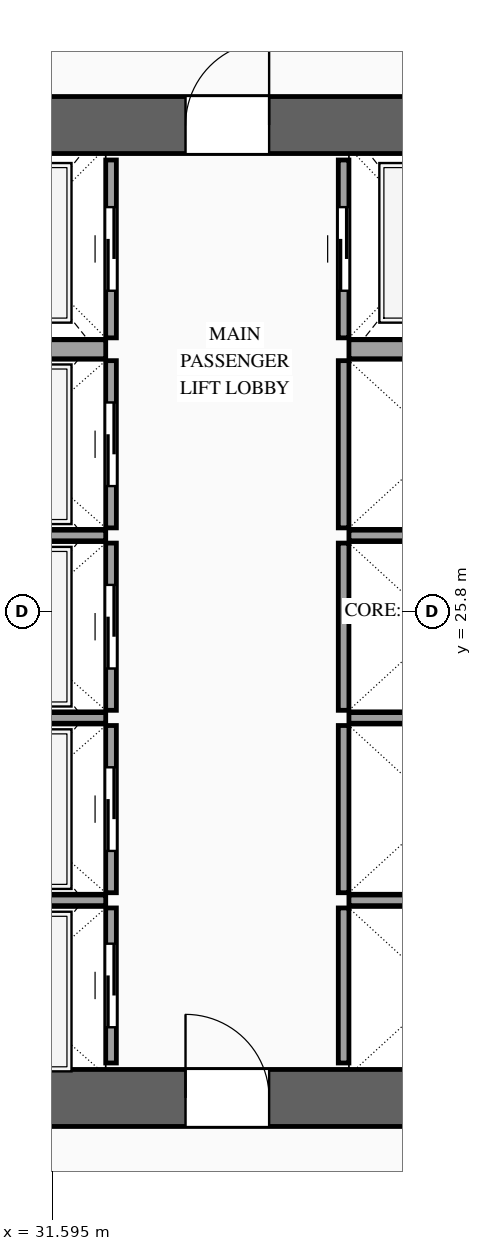
"""IFC4 building model, lengths in metres.
Left out: names, types, materials, properties, quantities, classifications, styles, units other than length and angle.
Written with IfcOpenShell. Run it as: python <this file> out.ifc"""

import sys

from ifc_helpers import new_model, si_unit, direction, frame, frame_2d, origin, place, context, subcontext, project, spatial, rectangle, extrude, source, transform, mapped, element, fill, save


model = new_model("IFC4")
c1 = context("Model", 3, precision=1e-05, world=origin(), true_north=direction((0.0, 1.0)))
c2 = subcontext(c1, "Body", "Model", "MODEL_VIEW")
j1 = project(units=[si_unit("LENGTHUNIT", "METRE"), si_unit("PLANEANGLEUNIT", "RADIAN")], contexts=[c1])
p1 = place(None, origin())
s1 = spatial("IfcSite", under=j1, at=p1, CompositionType="ELEMENT")
p2 = place(p1, origin())
s2 = spatial("IfcBuilding", under=s1, at=p2, CompositionType="ELEMENT")
p3 = place(p2, frame((0.0, 0.0, 97.4)))
s3 = spatial("IfcBuildingStorey", under=s2, at=p3, CompositionType="ELEMENT", Elevation=97.4)
p4 = place(p3, frame((23.425, 19.4, 0.0), z_axis=(0.0, 0.0, 1.0), x_axis=(1.0, 0.0, 0.0)))
e1 = element("IfcWall", 1, at=p4, inside=s3, PredefinedType="SHEAR", context=c2, shape_type="SweptSolid", body=[
    extrude(rectangle(XDim=27.15, YDim=0.75, at=frame_2d((13.575, 0.0))), origin(), (0.0, 0.0, 1.0), 3.6),
])
p5 = place(p4, frame((2.025, 0.0, 0.0)))
e2 = element("IfcOpeningElement", 2, at=p5, cuts=e1, PredefinedType="OPENING", context=c2, shape_type="SweptSolid", body=[
    extrude(rectangle(XDim=1.1, YDim=2.2, at=frame_2d((0.55, 1.1))), frame((0.0, 0.39, 0.0), z_axis=(0.0, -1.0, 0.0), x_axis=(1.0, 0.0, 0.0)), (0.0, 0.0, 1.0), 0.78),
])
p6 = place(p4, frame((9.925, 0.0, 0.0)))
e3 = element("IfcOpeningElement", 3, at=p6, cuts=e1, PredefinedType="OPENING", context=c2, shape_type="SweptSolid", body=[
    extrude(rectangle(XDim=1.1, YDim=2.2, at=frame_2d((0.55, 1.1))), frame((0.0, 0.39, 0.0), z_axis=(0.0, -1.0, 0.0), x_axis=(1.0, 0.0, 0.0)), (0.0, 0.0, 1.0), 0.78),
])
p7 = place(p4, frame((23.125, 0.0, 0.0)))
e4 = element("IfcOpeningElement", 4, at=p7, cuts=e1, PredefinedType="OPENING", context=c2, shape_type="SweptSolid", body=[
    extrude(rectangle(XDim=1.1, YDim=2.2, at=frame_2d((0.55, 1.1))), frame((0.0, 0.39, 0.0), z_axis=(0.0, -1.0, 0.0), x_axis=(1.0, 0.0, 0.0)), (0.0, 0.0, 1.0), 0.78),
])
p8 = place(p4, frame((19.745, 0.0, 0.0)))
e5 = element("IfcOpeningElement", 5, at=p8, cuts=e1, PredefinedType="OPENING", context=c2, shape_type="SweptSolid", body=[
    extrude(rectangle(XDim=0.9, YDim=2.15, at=frame_2d((0.45, 1.075))), frame((0.0, 0.39, 0.0), z_axis=(0.0, -1.0, 0.0), x_axis=(1.0, 0.0, 0.0)), (0.0, 0.0, 1.0), 0.78),
])
p9 = place(p4, frame((18.305, 0.0, 0.0)))
e6 = element("IfcOpeningElement", 6, at=p9, cuts=e1, PredefinedType="OPENING", context=c2, shape_type="SweptSolid", body=[
    extrude(rectangle(XDim=0.9, YDim=2.15, at=frame_2d((0.45, 1.075))), frame((0.0, 0.39, 0.0), z_axis=(0.0, -1.0, 0.0), x_axis=(1.0, 0.0, 0.0)), (0.0, 0.0, 1.0), 0.78),
])
p10 = place(p3, frame((23.425, 32.2, 0.0), z_axis=(0.0, 0.0, 1.0), x_axis=(1.0, 0.0, 0.0)))
e7 = element("IfcWall", 7, at=p10, inside=s3, PredefinedType="SHEAR", context=c2, shape_type="SweptSolid", body=[
    extrude(rectangle(XDim=27.15, YDim=0.75, at=frame_2d((13.575, 0.0))), origin(), (0.0, 0.0, 1.0), 3.6),
])
p11 = place(p10, frame((4.645, 0.0, 0.0)))
e8 = element("IfcOpeningElement", 8, at=p11, cuts=e7, PredefinedType="OPENING", context=c2, shape_type="SweptSolid", body=[
    extrude(rectangle(XDim=0.9, YDim=2.15, at=frame_2d((0.45, 1.075))), frame((0.0, 0.39, 0.0), z_axis=(0.0, -1.0, 0.0), x_axis=(1.0, 0.0, 0.0)), (0.0, 0.0, 1.0), 0.78),
])
p12 = place(p10, frame((9.925, 0.0, 0.0)))
e9 = element("IfcOpeningElement", 9, at=p12, cuts=e7, PredefinedType="OPENING", context=c2, shape_type="SweptSolid", body=[
    extrude(rectangle(XDim=1.1, YDim=2.2, at=frame_2d((0.55, 1.1))), frame((0.0, 0.39, 0.0), z_axis=(0.0, -1.0, 0.0), x_axis=(1.0, 0.0, 0.0)), (0.0, 0.0, 1.0), 0.78),
])
p13 = place(p10, frame((15.775, 0.0, 0.0)))
e10 = element("IfcOpeningElement", 10, at=p13, cuts=e7, PredefinedType="OPENING", context=c2, shape_type="SweptSolid", body=[
    extrude(rectangle(XDim=1.1, YDim=2.2, at=frame_2d((0.55, 1.1))), frame((0.0, 0.39, 0.0), z_axis=(0.0, -1.0, 0.0), x_axis=(1.0, 0.0, 0.0)), (0.0, 0.0, 1.0), 0.78),
])
p14 = place(p10, frame((18.975, 0.0, 0.0)))
e11 = element("IfcOpeningElement", 11, at=p14, cuts=e7, PredefinedType="OPENING", context=c2, shape_type="SweptSolid", body=[
    extrude(rectangle(XDim=0.9, YDim=2.15, at=frame_2d((0.45, 1.075))), frame((0.0, 0.39, 0.0), z_axis=(0.0, -1.0, 0.0), x_axis=(1.0, 0.0, 0.0)), (0.0, 0.0, 1.0), 0.78),
])
p15 = place(p3, frame((32.37, 19.86, 0.0), z_axis=(0.0, 0.0, 1.0), x_axis=(0.0, 1.0, 0.0)))
e12 = element("IfcWall", 12, at=p15, inside=s3, PredefinedType="SOLIDWALL", context=c2, shape_type="SweptSolid", body=[
    extrude(rectangle(XDim=2.04, YDim=0.14, at=frame_2d((1.02, 0.0))), origin(), (0.0, 0.0, 1.0), 3.38),
])
p16 = place(p15, frame((0.47, 0.0, 0.0)))
e13 = element("IfcOpeningElement", 13, at=p16, cuts=e12, PredefinedType="OPENING", context=c2, shape_type="SweptSolid", body=[
    extrude(rectangle(XDim=1.1, YDim=2.2, at=frame_2d((0.55, 1.1))), frame((0.0, 0.085, 0.0), z_axis=(0.0, -1.0, 0.0), x_axis=(1.0, 0.0, 0.0)), (0.0, 0.0, 1.0), 0.17),
])
m1 = source(origin(), c2, "Body", "SweptSolid", [
    extrude(rectangle(XDim=2.5, YDim=0.14, at=frame_2d((1.25, 0.0))), origin(), (0.0, 0.0, 1.0), 3.38),
])
p17 = place(p3, frame((29.8, 22.0, 0.0), z_axis=(0.0, 0.0, 1.0), x_axis=(1.0, 0.0, 0.0)))
e14 = element("IfcWall", 14, at=p17, inside=s3, PredefinedType="SOLIDWALL", context=c2, shape_type="MappedRepresentation", body=[
    mapped(m1, transform((0.0, 0.0, 0.0), scale=1.0)),
])
p18 = place(p3, frame((32.37, 22.1, 0.0), z_axis=(0.0, 0.0, 1.0), x_axis=(0.0, 1.0, 0.0)))
e15 = element("IfcWall", 15, at=p18, inside=s3, PredefinedType="SOLIDWALL", context=c2, shape_type="SweptSolid", body=[
    extrude(rectangle(XDim=2.2, YDim=0.14, at=frame_2d((1.1, 0.0))), origin(), (0.0, 0.0, 1.0), 3.38),
])
p19 = place(p18, frame((0.55, 0.0, 0.0)))
e16 = element("IfcOpeningElement", 16, at=p19, cuts=e15, PredefinedType="OPENING", context=c2, shape_type="SweptSolid", body=[
    extrude(rectangle(XDim=1.1, YDim=2.2, at=frame_2d((0.55, 1.1))), frame((0.0, 0.085, 0.0), z_axis=(0.0, -1.0, 0.0), x_axis=(1.0, 0.0, 0.0)), (0.0, 0.0, 1.0), 0.17),
])
p20 = place(p3, frame((29.8, 24.4, 0.0), z_axis=(0.0, 0.0, 1.0), x_axis=(1.0, 0.0, 0.0)))
e17 = element("IfcWall", 17, at=p20, inside=s3, PredefinedType="SOLIDWALL", context=c2, shape_type="MappedRepresentation", body=[
    mapped(m1, transform((0.0, 0.0, 0.0), scale=1.0)),
])
p21 = place(p3, frame((32.37, 24.5, 0.0), z_axis=(0.0, 0.0, 1.0), x_axis=(0.0, 1.0, 0.0)))
e18 = element("IfcWall", 18, at=p21, inside=s3, PredefinedType="SOLIDWALL", context=c2, shape_type="SweptSolid", body=[
    extrude(rectangle(XDim=2.2, YDim=0.14, at=frame_2d((1.1, 0.0))), origin(), (0.0, 0.0, 1.0), 3.38),
])
p22 = place(p21, frame((0.55, 0.0, 0.0)))
e19 = element("IfcOpeningElement", 19, at=p22, cuts=e18, PredefinedType="OPENING", context=c2, shape_type="SweptSolid", body=[
    extrude(rectangle(XDim=1.1, YDim=2.2, at=frame_2d((0.55, 1.1))), frame((0.0, 0.085, 0.0), z_axis=(0.0, -1.0, 0.0), x_axis=(1.0, 0.0, 0.0)), (0.0, 0.0, 1.0), 0.17),
])
p23 = place(p3, frame((29.8, 26.8, 0.0), z_axis=(0.0, 0.0, 1.0), x_axis=(1.0, 0.0, 0.0)))
e20 = element("IfcWall", 20, at=p23, inside=s3, PredefinedType="SOLIDWALL", context=c2, shape_type="MappedRepresentation", body=[
    mapped(m1, transform((0.0, 0.0, 0.0), scale=1.0)),
])
p24 = place(p3, frame((32.37, 26.9, 0.0), z_axis=(0.0, 0.0, 1.0), x_axis=(0.0, 1.0, 0.0)))
e21 = element("IfcWall", 21, at=p24, inside=s3, PredefinedType="SOLIDWALL", context=c2, shape_type="SweptSolid", body=[
    extrude(rectangle(XDim=2.2, YDim=0.14, at=frame_2d((1.1, 0.0))), origin(), (0.0, 0.0, 1.0), 3.38),
])
p25 = place(p24, frame((0.55, 0.0, 0.0)))
e22 = element("IfcOpeningElement", 22, at=p25, cuts=e21, PredefinedType="OPENING", context=c2, shape_type="SweptSolid", body=[
    extrude(rectangle(XDim=1.1, YDim=2.2, at=frame_2d((0.55, 1.1))), frame((0.0, 0.085, 0.0), z_axis=(0.0, -1.0, 0.0), x_axis=(1.0, 0.0, 0.0)), (0.0, 0.0, 1.0), 0.17),
])
p26 = place(p3, frame((32.37, 29.4, 0.0), z_axis=(0.0, 0.0, 1.0), x_axis=(0.0, 1.0, 0.0)))
e23 = element("IfcWall", 23, at=p26, inside=s3, PredefinedType="SOLIDWALL", context=c2, shape_type="SweptSolid", body=[
    extrude(rectangle(XDim=2.34, YDim=0.14, at=frame_2d((1.17, 0.0))), origin(), (0.0, 0.0, 1.0), 3.38),
])
p27 = place(p26, frame((0.62, 0.0, 0.0)))
e24 = element("IfcOpeningElement", 24, at=p27, cuts=e23, PredefinedType="OPENING", context=c2, shape_type="SweptSolid", body=[
    extrude(rectangle(XDim=1.1, YDim=2.2, at=frame_2d((0.55, 1.1))), frame((0.0, 0.085, 0.0), z_axis=(0.0, -1.0, 0.0), x_axis=(1.0, 0.0, 0.0)), (0.0, 0.0, 1.0), 0.17),
])
m2 = source(origin(), c2, "Body", "SweptSolid", [
    extrude(rectangle(XDim=2.5, YDim=0.25, at=frame_2d((1.25, 0.0))), origin(), (0.0, 0.0, 1.0), 3.38),
])
p28 = place(p3, frame((29.8, 29.25, 0.0), z_axis=(0.0, 0.0, 1.0), x_axis=(1.0, 0.0, 0.0)))
e25 = element("IfcWall", 25, at=p28, inside=s3, PredefinedType="SOLIDWALL", context=c2, shape_type="MappedRepresentation", body=[
    mapped(m2, transform((0.0, 0.0, 0.0), scale=1.0)),
])
m3 = source(origin(), c2, "Body", "SweptSolid", [
    extrude(rectangle(XDim=2.04, YDim=0.14, at=frame_2d((1.02, 0.0))), origin(), (0.0, 0.0, 1.0), 3.38),
])
p29 = place(p3, frame((35.43, 19.86, 0.0), z_axis=(0.0, 0.0, 1.0), x_axis=(0.0, 1.0, 0.0)))
e26 = element("IfcWall", 26, at=p29, inside=s3, PredefinedType="SOLIDWALL", context=c2, shape_type="MappedRepresentation", body=[
    mapped(m3, transform((0.0, 0.0, 0.0), scale=1.0)),
])
m4 = source(origin(), c2, "Body", "SweptSolid", [
    extrude(rectangle(XDim=2.4, YDim=0.14, at=frame_2d((1.2, 0.0))), origin(), (0.0, 0.0, 1.0), 3.38),
])
p30 = place(p3, frame((35.5, 22.0, 0.0), z_axis=(0.0, 0.0, 1.0), x_axis=(1.0, 0.0, 0.0)))
e27 = element("IfcWall", 27, at=p30, inside=s3, PredefinedType="SOLIDWALL", context=c2, shape_type="MappedRepresentation", body=[
    mapped(m4, transform((0.0, 0.0, 0.0), scale=1.0)),
])
m5 = source(origin(), c2, "Body", "SweptSolid", [
    extrude(rectangle(XDim=2.2, YDim=0.14, at=frame_2d((1.1, 0.0))), origin(), (0.0, 0.0, 1.0), 3.38),
])
p31 = place(p3, frame((35.43, 22.1, 0.0), z_axis=(0.0, 0.0, 1.0), x_axis=(0.0, 1.0, 0.0)))
e28 = element("IfcWall", 28, at=p31, inside=s3, PredefinedType="SOLIDWALL", context=c2, shape_type="MappedRepresentation", body=[
    mapped(m5, transform((0.0, 0.0, 0.0), scale=1.0)),
])
p32 = place(p3, frame((35.5, 24.4, 0.0), z_axis=(0.0, 0.0, 1.0), x_axis=(1.0, 0.0, 0.0)))
e29 = element("IfcWall", 29, at=p32, inside=s3, PredefinedType="SOLIDWALL", context=c2, shape_type="MappedRepresentation", body=[
    mapped(m4, transform((0.0, 0.0, 0.0), scale=1.0)),
])
p33 = place(p3, frame((35.43, 24.5, 0.0), z_axis=(0.0, 0.0, 1.0), x_axis=(0.0, 1.0, 0.0)))
e30 = element("IfcWall", 30, at=p33, inside=s3, PredefinedType="SOLIDWALL", context=c2, shape_type="MappedRepresentation", body=[
    mapped(m5, transform((0.0, 0.0, 0.0), scale=1.0)),
])
p34 = place(p3, frame((35.5, 26.8, 0.0), z_axis=(0.0, 0.0, 1.0), x_axis=(1.0, 0.0, 0.0)))
e31 = element("IfcWall", 31, at=p34, inside=s3, PredefinedType="SOLIDWALL", context=c2, shape_type="MappedRepresentation", body=[
    mapped(m4, transform((0.0, 0.0, 0.0), scale=1.0)),
])
m6 = source(origin(), c2, "Body", "SweptSolid", [
    extrude(rectangle(XDim=2.2, YDim=0.14, at=frame_2d((1.1, 0.0))), origin(), (0.0, 0.0, 1.0), 3.38),
])
p35 = place(p3, frame((35.43, 26.9, 0.0), z_axis=(0.0, 0.0, 1.0), x_axis=(0.0, 1.0, 0.0)))
e32 = element("IfcWall", 32, at=p35, inside=s3, PredefinedType="SOLIDWALL", context=c2, shape_type="MappedRepresentation", body=[
    mapped(m6, transform((0.0, 0.0, 0.0), scale=1.0)),
])
p36 = place(p3, frame((35.43, 29.4, 0.0), z_axis=(0.0, 0.0, 1.0), x_axis=(0.0, 1.0, 0.0)))
e33 = element("IfcWall", 33, at=p36, inside=s3, PredefinedType="SOLIDWALL", context=c2, shape_type="SweptSolid", body=[
    extrude(rectangle(XDim=2.34, YDim=0.14, at=frame_2d((1.17, 0.0))), origin(), (0.0, 0.0, 1.0), 3.38),
])
p37 = place(p36, frame((0.62, 0.0, 0.0)))
e34 = element("IfcOpeningElement", 34, at=p37, cuts=e33, PredefinedType="OPENING", context=c2, shape_type="SweptSolid", body=[
    extrude(rectangle(XDim=1.1, YDim=2.2, at=frame_2d((0.55, 1.1))), frame((0.0, 0.085, 0.0), z_axis=(0.0, -1.0, 0.0), x_axis=(1.0, 0.0, 0.0)), (0.0, 0.0, 1.0), 0.17),
])
m7 = source(origin(), c2, "Body", "SweptSolid", [
    extrude(rectangle(XDim=2.4, YDim=0.25, at=frame_2d((1.2, 0.0))), origin(), (0.0, 0.0, 1.0), 3.38),
])
p38 = place(p3, frame((35.5, 29.25, 0.0), z_axis=(0.0, 0.0, 1.0), x_axis=(1.0, 0.0, 0.0)))
e35 = element("IfcWall", 35, at=p38, inside=s3, PredefinedType="SOLIDWALL", context=c2, shape_type="MappedRepresentation", body=[
    mapped(m7, transform((0.0, 0.0, 0.0), scale=1.0)),
])
m8 = source(origin(), c2, "Body", "SweptSolid", [
    extrude(rectangle(XDim=1.1, YDim=2.2, at=frame_2d((0.55, 1.1))), frame((0.0, 0.025, 0.0), z_axis=(0.0, -1.0, 0.0), x_axis=(1.0, 0.0, 0.0)), (0.0, 0.0, 1.0), 0.05),
])
p39 = place(p16, origin())
e36 = element("IfcDoor", 36, at=p39, inside=s3, OperationType="SLIDING_TO_LEFT", PredefinedType="DOOR", context=c2, shape_type="MappedRepresentation", body=[
    mapped(m8, transform((0.0, 0.0, 0.0), scale=1.0)),
])
fill(e13, e36)
p40 = place(p19, origin())
e37 = element("IfcDoor", 37, at=p40, inside=s3, OperationType="SLIDING_TO_RIGHT", PredefinedType="DOOR", context=c2, shape_type="MappedRepresentation", body=[
    mapped(m8, transform((0.0, 0.0, 0.0), scale=1.0)),
])
fill(e16, e37)
p41 = place(p22, origin())
e38 = element("IfcDoor", 38, at=p41, inside=s3, OperationType="SLIDING_TO_LEFT", PredefinedType="DOOR", context=c2, shape_type="MappedRepresentation", body=[
    mapped(m8, transform((0.0, 0.0, 0.0), scale=1.0)),
])
fill(e19, e38)
p42 = place(p25, origin())
e39 = element("IfcDoor", 39, at=p42, inside=s3, OperationType="SLIDING_TO_RIGHT", PredefinedType="DOOR", context=c2, shape_type="MappedRepresentation", body=[
    mapped(m8, transform((0.0, 0.0, 0.0), scale=1.0)),
])
fill(e22, e39)
p43 = place(p27, origin())
e40 = element("IfcDoor", 40, at=p43, inside=s3, OperationType="SLIDING_TO_LEFT", PredefinedType="DOOR", context=c2, shape_type="MappedRepresentation", body=[
    mapped(m8, transform((0.0, 0.0, 0.0), scale=1.0)),
])
fill(e24, e40)
p44 = place(p37, origin())
e41 = element("IfcDoor", 41, at=p44, inside=s3, OperationType="SLIDING_TO_RIGHT", PredefinedType="DOOR", context=c2, shape_type="MappedRepresentation", body=[
    mapped(m8, transform((0.0, 0.0, 0.0), scale=1.0)),
])
fill(e34, e41)
m9 = source(origin(), c2, "Body", "SweptSolid", [
    extrude(rectangle(XDim=1.1, YDim=2.2, at=frame_2d((0.55, 1.1))), frame((0.0, 0.025, 0.0), z_axis=(0.0, -1.0, 0.0), x_axis=(1.0, 0.0, 0.0)), (0.0, 0.0, 1.0), 0.05),
])
p45 = place(p6, origin())
e42 = element("IfcDoor", 42, at=p45, inside=s3, OperationType="SINGLE_SWING_LEFT", PredefinedType="DOOR", context=c2, shape_type="MappedRepresentation", body=[
    mapped(m9, transform((0.0, 0.0, 0.0), scale=1.0)),
])
fill(e3, e42)
p46 = place(p12, origin())
e43 = element("IfcDoor", 43, at=p46, inside=s3, OperationType="SINGLE_SWING_RIGHT", PredefinedType="DOOR", context=c2, shape_type="MappedRepresentation", body=[
    mapped(m9, transform((0.0, 0.0, 0.0), scale=1.0)),
])
fill(e9, e43)
save(model, sys.argv[1])
